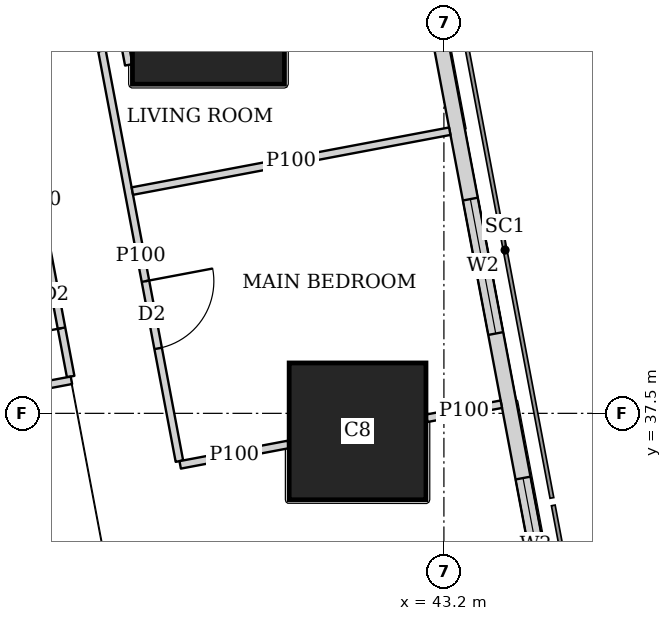
"""IFC4 building model, lengths in metres.
Left out: names, types, materials, properties, quantities, classifications, styles, units other than length and angle.
Written with IfcOpenShell. Run it as: python <this file> out.ifc"""

import sys

from ifc_helpers import new_model, si_unit, direction, frame, frame_2d, origin, origin_2d, place, context, subcontext, project, spatial, rectangle, extrude, element, fill, save


model = new_model("IFC4")
c1 = context("Model", 3, precision=1e-05, world=origin(), true_north=direction((0.0, 1.0)))
c2 = subcontext(c1, "Body", "Model", "MODEL_VIEW")
j1 = project(units=[si_unit("LENGTHUNIT", "METRE"), si_unit("PLANEANGLEUNIT", "RADIAN")], contexts=[c1])
p1 = place(None, origin())
s1 = spatial("IfcSite", under=j1, at=p1, CompositionType="ELEMENT")
p2 = place(p1, origin())
s2 = spatial("IfcBuilding", under=s1, at=p2, CompositionType="ELEMENT")
p3 = place(p2, frame((0.0, 0.0, 184.55)))
s3 = spatial("IfcBuildingStorey", under=s2, at=p3, CompositionType="ELEMENT", Elevation=184.55)
p4 = place(p3, frame((42.064, 37.263, 0.0), z_axis=(0.0, 0.0, 1.0), x_axis=(1.0, 0.0, 0.0)))
e1 = element("IfcColumn", 1, at=p4, inside=s3, PredefinedType="COLUMN", context=c2, shape_type="SweptSolid", body=[
    extrude(rectangle(XDim=1.8, YDim=1.8, at=origin_2d()), origin(), (0.0, 0.0, 1.0), 3.75),
])
p5 = place(p3, frame((40.102, 42.83, 0.0), z_axis=(0.0, 0.0, 1.0), x_axis=(1.0, 0.0, 0.0)))
e2 = element("IfcColumn", 2, at=p5, inside=s3, PredefinedType="COLUMN", context=c2, shape_type="SweptSolid", body=[
    extrude(rectangle(XDim=2.0, YDim=2.0, at=origin_2d()), origin(), (0.0, 0.0, 1.0), 3.75),
])
p6 = place(p3, frame((50.653, 2.703, 0.0), z_axis=(0.0, 0.0, 1.0), x_axis=(-0.185612026696, 0.982623109613, 0.0)))
e3 = element("IfcWall", 3, at=p6, inside=s3, PredefinedType="SOLIDWALL", context=c2, shape_type="SweptSolid", body=[
    extrude(rectangle(XDim=41.393, YDim=0.2, at=frame_2d((20.697, 0.0))), origin(), (0.0, 0.0, 1.0), 3.45),
])
p7 = place(p6, frame((1.633, 0.0, 0.9)))
e4 = element("IfcOpeningElement", 4, at=p7, cuts=e3, PredefinedType="OPENING", context=c2, shape_type="SweptSolid", body=[
    extrude(rectangle(XDim=1.8, YDim=1.5, at=frame_2d((0.9, 0.75))), frame((0.0, 0.11, 0.0), z_axis=(0.0, -1.0, 0.0), x_axis=(1.0, 0.0, 0.0)), (0.0, 0.0, 1.0), 0.22),
])
p8 = place(p6, frame((6.032, 0.0, 0.9)))
e5 = element("IfcOpeningElement", 5, at=p8, cuts=e3, PredefinedType="OPENING", context=c2, shape_type="SweptSolid", body=[
    extrude(rectangle(XDim=1.8, YDim=1.5, at=frame_2d((0.9, 0.75))), frame((0.0, 0.11, 0.0), z_axis=(0.0, -1.0, 0.0), x_axis=(1.0, 0.0, 0.0)), (0.0, 0.0, 1.0), 0.22),
])
p9 = place(p6, frame((9.848, 0.0, 0.9)))
e6 = element("IfcOpeningElement", 6, at=p9, cuts=e3, PredefinedType="OPENING", context=c2, shape_type="SweptSolid", body=[
    extrude(rectangle(XDim=1.8, YDim=1.5, at=frame_2d((0.9, 0.75))), frame((0.0, 0.11, 0.0), z_axis=(0.0, -1.0, 0.0), x_axis=(1.0, 0.0, 0.0)), (0.0, 0.0, 1.0), 0.22),
])
p10 = place(p6, frame((13.664, 0.0, 0.9)))
e7 = element("IfcOpeningElement", 7, at=p10, cuts=e3, PredefinedType="OPENING", context=c2, shape_type="SweptSolid", body=[
    extrude(rectangle(XDim=1.8, YDim=1.5, at=frame_2d((0.9, 0.75))), frame((0.0, 0.11, 0.0), z_axis=(0.0, -1.0, 0.0), x_axis=(1.0, 0.0, 0.0)), (0.0, 0.0, 1.0), 0.22),
])
p11 = place(p6, frame((17.481, 0.0, 0.9)))
e8 = element("IfcOpeningElement", 8, at=p11, cuts=e3, PredefinedType="OPENING", context=c2, shape_type="SweptSolid", body=[
    extrude(rectangle(XDim=1.8, YDim=1.5, at=frame_2d((0.9, 0.75))), frame((0.0, 0.11, 0.0), z_axis=(0.0, -1.0, 0.0), x_axis=(1.0, 0.0, 0.0)), (0.0, 0.0, 1.0), 0.22),
])
p12 = place(p6, frame((21.297, 0.0, 0.9)))
e9 = element("IfcOpeningElement", 9, at=p12, cuts=e3, PredefinedType="OPENING", context=c2, shape_type="SweptSolid", body=[
    extrude(rectangle(XDim=1.8, YDim=1.5, at=frame_2d((0.9, 0.75))), frame((0.0, 0.11, 0.0), z_axis=(0.0, -1.0, 0.0), x_axis=(1.0, 0.0, 0.0)), (0.0, 0.0, 1.0), 0.22),
])
p13 = place(p6, frame((25.113, 0.0, 0.9)))
e10 = element("IfcOpeningElement", 10, at=p13, cuts=e3, PredefinedType="OPENING", context=c2, shape_type="SweptSolid", body=[
    extrude(rectangle(XDim=1.8, YDim=1.5, at=frame_2d((0.9, 0.75))), frame((0.0, 0.11, 0.0), z_axis=(0.0, -1.0, 0.0), x_axis=(1.0, 0.0, 0.0)), (0.0, 0.0, 1.0), 0.22),
])
p14 = place(p6, frame((28.93, 0.0, 0.9)))
e11 = element("IfcOpeningElement", 11, at=p14, cuts=e3, PredefinedType="OPENING", context=c2, shape_type="SweptSolid", body=[
    extrude(rectangle(XDim=1.8, YDim=1.5, at=frame_2d((0.9, 0.75))), frame((0.0, 0.11, 0.0), z_axis=(0.0, -1.0, 0.0), x_axis=(1.0, 0.0, 0.0)), (0.0, 0.0, 1.0), 0.22),
])
p15 = place(p6, frame((32.746, 0.0, 0.9)))
e12 = element("IfcOpeningElement", 12, at=p15, cuts=e3, PredefinedType="OPENING", context=c2, shape_type="SweptSolid", body=[
    extrude(rectangle(XDim=1.8, YDim=1.5, at=frame_2d((0.9, 0.75))), frame((0.0, 0.11, 0.0), z_axis=(0.0, -1.0, 0.0), x_axis=(1.0, 0.0, 0.0)), (0.0, 0.0, 1.0), 0.22),
])
p16 = place(p6, frame((36.481, 0.0, 0.9)))
e13 = element("IfcOpeningElement", 13, at=p16, cuts=e3, PredefinedType="OPENING", context=c2, shape_type="SweptSolid", body=[
    extrude(rectangle(XDim=1.8, YDim=1.5, at=frame_2d((0.9, 0.75))), frame((0.0, 0.11, 0.0), z_axis=(0.0, -1.0, 0.0), x_axis=(1.0, 0.0, 0.0)), (0.0, 0.0, 1.0), 0.22),
])
p17 = place(p3, frame((33.623, 43.022, 0.0), z_axis=(0.0, 0.0, 1.0), x_axis=(0.185596841028, -0.98262597798, 0.0)))
e14 = element("IfcWall", 14, at=p17, inside=s3, PredefinedType="SOLIDWALL", context=c2, shape_type="SweptSolid", body=[
    extrude(rectangle(XDim=41.66, YDim=0.15, at=frame_2d((20.83, 0.0))), origin(), (0.0, 0.0, 1.0), 2.45),
])
p18 = place(p17, frame((8.034, 0.0, 0.0)))
e15 = element("IfcOpeningElement", 15, at=p18, cuts=e14, PredefinedType="OPENING", context=c2, shape_type="SweptSolid", body=[
    extrude(rectangle(XDim=1.0, YDim=2.1, at=frame_2d((0.5, 1.05))), frame((0.0, 0.085, 0.0), z_axis=(0.0, -1.0, 0.0), x_axis=(1.0, 0.0, 0.0)), (0.0, 0.0, 1.0), 0.17),
])
p19 = place(p17, frame((12.611, 0.0, 0.0)))
e16 = element("IfcOpeningElement", 16, at=p19, cuts=e14, PredefinedType="OPENING", context=c2, shape_type="SweptSolid", body=[
    extrude(rectangle(XDim=1.0, YDim=2.1, at=frame_2d((0.5, 1.05))), frame((0.0, 0.085, 0.0), z_axis=(0.0, -1.0, 0.0), x_axis=(1.0, 0.0, 0.0)), (0.0, 0.0, 1.0), 0.17),
])
p20 = place(p17, frame((20.242, 0.0, 0.0)))
e17 = element("IfcOpeningElement", 17, at=p20, cuts=e14, PredefinedType="OPENING", context=c2, shape_type="SweptSolid", body=[
    extrude(rectangle(XDim=1.0, YDim=2.1, at=frame_2d((0.5, 1.05))), frame((0.0, 0.085, 0.0), z_axis=(0.0, -1.0, 0.0), x_axis=(1.0, 0.0, 0.0)), (0.0, 0.0, 1.0), 0.17),
])
p21 = place(p17, frame((31.206, 0.0, 0.0)))
e18 = element("IfcOpeningElement", 18, at=p21, cuts=e14, PredefinedType="OPENING", context=c2, shape_type="SweptSolid", body=[
    extrude(rectangle(XDim=1.0, YDim=2.1, at=frame_2d((0.5, 1.05))), frame((0.0, 0.085, 0.0), z_axis=(0.0, -1.0, 0.0), x_axis=(1.0, 0.0, 0.0)), (0.0, 0.0, 1.0), 0.17),
])
p22 = place(p3, frame((39.054, 42.085, 0.0), z_axis=(0.0, 0.0, 1.0), x_axis=(-0.185791584218, 0.982589175207, 0.0)))
e19 = element("IfcWall", 19, at=p22, inside=s3, PredefinedType="PARTITIONING", context=c2, shape_type="SweptSolid", body=[
    extrude(rectangle(XDim=3.628, YDim=0.1, at=frame_2d((1.814, 0.0))), origin(), (0.0, 0.0, 1.0), 2.05),
])
p23 = place(p3, frame((38.701, 42.27, 0.0), z_axis=(0.0, 0.0, 1.0), x_axis=(0.185474244877, -0.982649125826, 0.0)))
e20 = element("IfcWall", 20, at=p23, inside=s3, PredefinedType="PARTITIONING", context=c2, shape_type="SweptSolid", body=[
    extrude(rectangle(XDim=5.494, YDim=0.1, at=frame_2d((2.747, 0.0))), origin(), (0.0, 0.0, 1.0), 3.45),
])
p24 = place(p23, frame((3.085, 0.0, 0.0)))
e21 = element("IfcOpeningElement", 21, at=p24, cuts=e20, PredefinedType="OPENING", context=c2, shape_type="SweptSolid", body=[
    extrude(rectangle(XDim=0.9, YDim=2.1, at=frame_2d((0.45, 1.05))), frame((0.0, 0.06, 0.0), z_axis=(0.0, -1.0, 0.0), x_axis=(1.0, 0.0, 0.0)), (0.0, 0.0, 1.0), 0.12),
])
p25 = place(p3, frame((37.41, 42.639, 0.0), z_axis=(0.0, 0.0, 1.0), x_axis=(0.185579683022, -0.982629218601, 0.0)))
e22 = element("IfcWall", 22, at=p25, inside=s3, PredefinedType="PARTITIONING", context=c2, shape_type="SweptSolid", body=[
    extrude(rectangle(XDim=4.737, YDim=0.1, at=frame_2d((2.369, 0.0))), origin(), (0.0, 0.0, 1.0), 3.45),
])
p26 = place(p25, frame((3.189, 0.0, 0.0)))
e23 = element("IfcOpeningElement", 23, at=p26, cuts=e22, PredefinedType="OPENING", context=c2, shape_type="SweptSolid", body=[
    extrude(rectangle(XDim=0.9, YDim=2.1, at=frame_2d((0.45, 1.05))), frame((0.0, 0.06, 0.0), z_axis=(0.0, -1.0, 0.0), x_axis=(1.0, 0.0, 0.0)), (0.0, 0.0, 1.0), 0.12),
])
p27 = place(p25, frame((1.191, 0.0, 0.0)))
e24 = element("IfcOpeningElement", 24, at=p27, cuts=e22, PredefinedType="OPENING", context=c2, shape_type="SweptSolid", body=[
    extrude(rectangle(XDim=0.9, YDim=2.1, at=frame_2d((0.45, 1.05))), frame((0.0, 0.06, 0.0), z_axis=(0.0, -1.0, 0.0), x_axis=(1.0, 0.0, 0.0)), (0.0, 0.0, 1.0), 0.12),
])
p28 = place(p3, frame((43.277, 41.212, 0.0), z_axis=(0.0, 0.0, 1.0), x_axis=(-0.982665405803, -0.185387972203, 0.0)))
e25 = element("IfcWall", 25, at=p28, inside=s3, PredefinedType="PARTITIONING", context=c2, shape_type="SweptSolid", body=[
    extrude(rectangle(XDim=4.25, YDim=0.1, at=frame_2d((2.125, 0.0))), origin(), (0.0, 0.0, 1.0), 2.05),
])
p29 = place(p3, frame((43.955, 37.62, 0.0), z_axis=(0.0, 0.0, 1.0), x_axis=(-0.982666697719, -0.185381124159, 0.0)))
e26 = element("IfcWall", 26, at=p29, inside=s3, PredefinedType="PARTITIONING", context=c2, shape_type="SweptSolid", body=[
    extrude(rectangle(XDim=0.998, YDim=0.1, at=frame_2d((0.499, 0.0))), origin(), (0.0, 0.0, 1.0), 3.45),
])
p30 = place(p3, frame((41.154, 37.091, 0.0), z_axis=(0.0, 0.0, 1.0), x_axis=(-0.982617614942, -0.185641112921, 0.0)))
e27 = element("IfcWall", 27, at=p30, inside=s3, PredefinedType="PARTITIONING", context=c2, shape_type="SweptSolid", body=[
    extrude(rectangle(XDim=1.449, YDim=0.1, at=frame_2d((0.725, 0.0))), origin(), (0.0, 0.0, 1.0), 3.45),
])
p31 = place(p3, frame((38.299, 37.935, 0.0), z_axis=(0.0, 0.0, 1.0), x_axis=(-0.98258870752, -0.18579405764, 0.0)))
e28 = element("IfcWall", 28, at=p31, inside=s3, PredefinedType="PARTITIONING", context=c2, shape_type="SweptSolid", body=[
    extrude(rectangle(XDim=1.566, YDim=0.1, at=frame_2d((0.783, 0.0))), origin(), (0.0, 0.0, 1.0), 3.45),
])
p32 = place(p15, origin())
e29 = element("IfcWindow", 29, at=p32, inside=s3, PartitioningType="SINGLE_PANEL", PredefinedType="WINDOW", context=c2, shape_type="SweptSolid", body=[
    extrude(rectangle(XDim=1.8, YDim=1.5, at=frame_2d((0.9, 0.75))), frame((0.0, 0.03, 0.0), z_axis=(0.0, -1.0, 0.0), x_axis=(1.0, 0.0, 0.0)), (0.0, 0.0, 1.0), 0.06),
])
fill(e12, e29)
p33 = place(p16, origin())
e30 = element("IfcWindow", 30, at=p33, inside=s3, PartitioningType="SINGLE_PANEL", PredefinedType="WINDOW", context=c2, shape_type="SweptSolid", body=[
    extrude(rectangle(XDim=1.8, YDim=1.5, at=frame_2d((0.9, 0.75))), frame((0.0, 0.03, 0.0), z_axis=(0.0, -1.0, 0.0), x_axis=(1.0, 0.0, 0.0)), (0.0, 0.0, 1.0), 0.06),
])
fill(e13, e30)
p34 = place(p24, origin())
e31 = element("IfcDoor", 31, at=p34, inside=s3, OperationType="SINGLE_SWING_LEFT", PredefinedType="DOOR", context=c2, shape_type="SweptSolid", body=[
    extrude(rectangle(XDim=0.9, YDim=2.1, at=frame_2d((0.45, 1.05))), frame((0.0, 0.025, 0.0), z_axis=(0.0, -1.0, 0.0), x_axis=(1.0, 0.0, 0.0)), (0.0, 0.0, 1.0), 0.05),
])
fill(e21, e31)
p35 = place(p26, origin())
e32 = element("IfcDoor", 32, at=p35, inside=s3, OperationType="SINGLE_SWING_LEFT", PredefinedType="DOOR", context=c2, shape_type="SweptSolid", body=[
    extrude(rectangle(XDim=0.9, YDim=2.1, at=frame_2d((0.45, 1.05))), frame((0.0, 0.025, 0.0), z_axis=(0.0, -1.0, 0.0), x_axis=(1.0, 0.0, 0.0)), (0.0, 0.0, 1.0), 0.05),
])
fill(e23, e32)
save(model, sys.argv[1])
